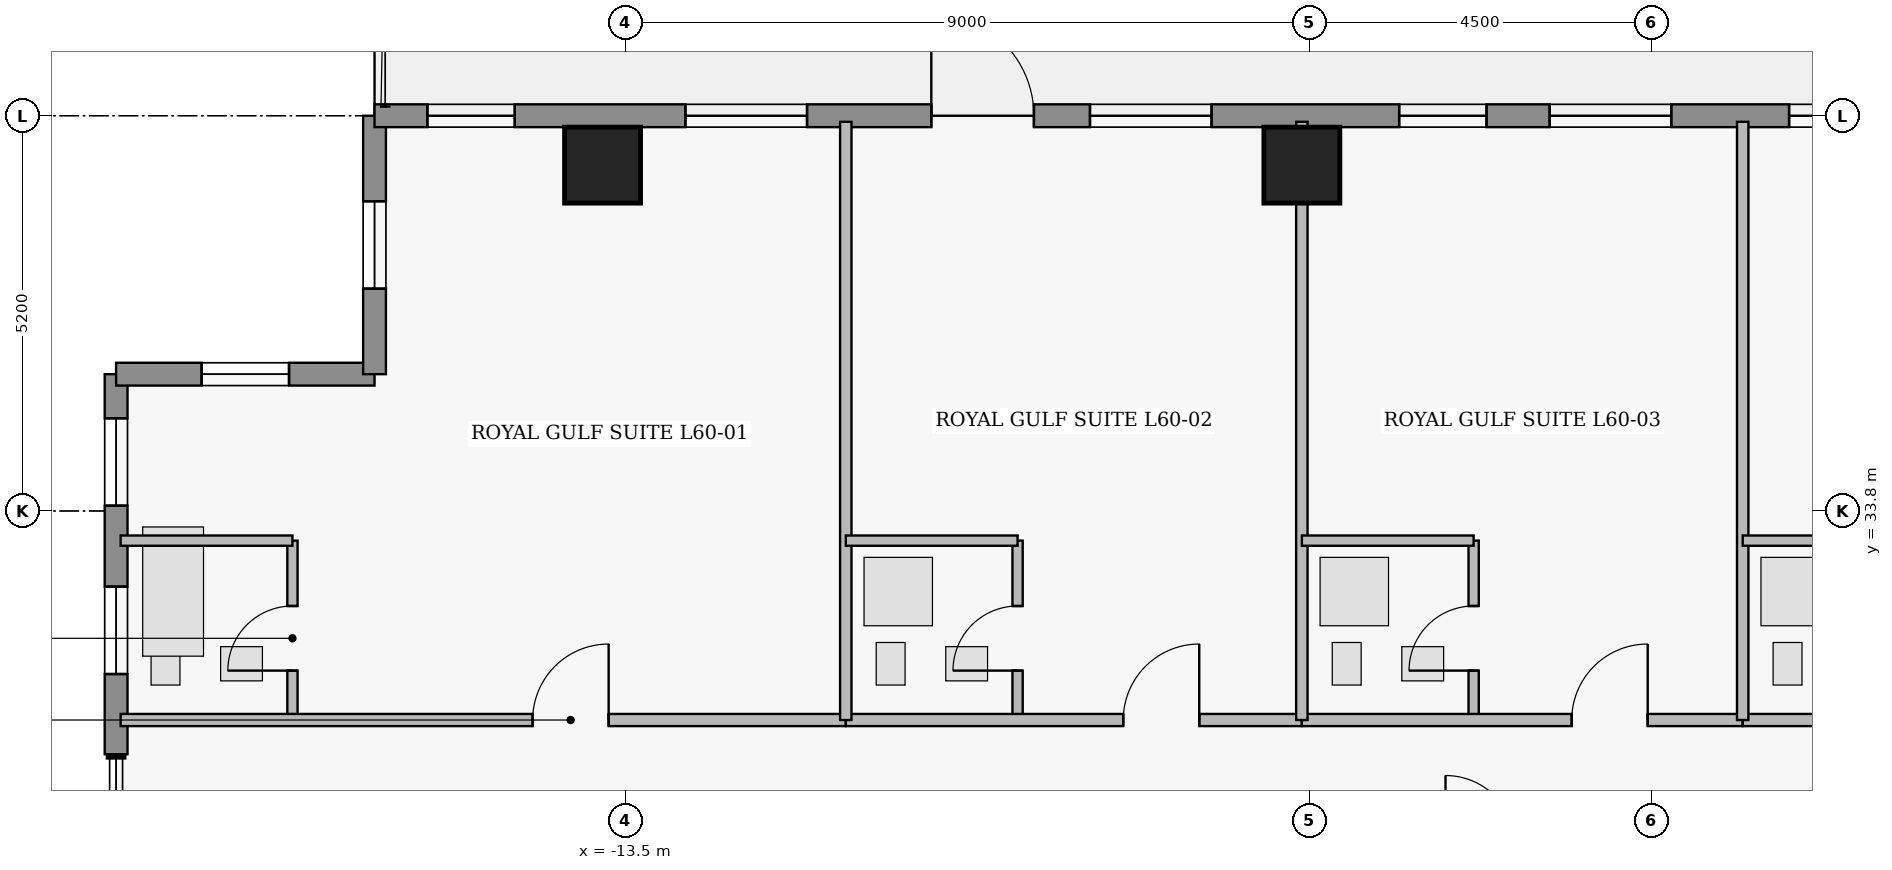
"""IFC4 building model, lengths in metres.
Left out: names, types, materials, properties, quantities, classifications, styles, units other than length and angle.
Written with IfcOpenShell. Run it as: python <this file> out.ifc"""

import sys

from ifc_helpers import new_model, si_unit, direction, frame, frame_2d, origin, origin_2d, place, context, subcontext, project, spatial, rectangle, extrude, element, fill, save


model = new_model("IFC4")
c1 = context("Model", 3, precision=1e-05, world=origin(), true_north=direction((0.0, 1.0)))
c2 = subcontext(c1, "Body", "Model", "MODEL_VIEW")
j1 = project(units=[si_unit("LENGTHUNIT", "METRE"), si_unit("PLANEANGLEUNIT", "RADIAN")], contexts=[c1])
p1 = place(None, origin())
s1 = spatial("IfcSite", under=j1, at=p1, CompositionType="ELEMENT")
p2 = place(p1, origin())
s2 = spatial("IfcBuilding", under=s1, at=p2, CompositionType="ELEMENT")
p3 = place(p2, frame((0.0, 0.0, 239.65)))
s3 = spatial("IfcBuildingStorey", under=s2, at=p3, CompositionType="ELEMENT", Elevation=239.65)
for number, where, z_axis, x_axis in (
    (1, (-13.8, 38.35, 0.43), (0.0, 0.0, 1.0), (1.0, 0.0, 0.0)),
    (2, (-4.6, 38.35, 0.43), (0.0, 0.0, 1.0), (1.0, 0.0, 0.0)),
):
    element("IfcColumn", number, at=place(p3, frame(where, z_axis=z_axis, x_axis=x_axis)), inside=s3, PredefinedType="COLUMN", context=c2, shape_type="SweptSolid", body=[
        extrude(rectangle(XDim=1.0, YDim=1.0, at=origin_2d()), origin(), (0.0, 0.0, 1.0), 3.27),
    ])
p4 = place(p3, frame((-20.2, 30.6, 0.0), z_axis=(0.0, 0.0, 1.0), x_axis=(0.0, 1.0, 0.0)))
e3 = element("IfcWall", 3, at=p4, inside=s3, PredefinedType="STANDARD", context=c2, shape_type="SweptSolid", body=[
    extrude(rectangle(XDim=5.0, YDim=0.3, at=frame_2d((2.5, 0.0))), origin(), (0.0, 0.0, 1.0), 3.48),
])
p5 = place(p4, frame((1.055, 0.0, 0.95)))
e4 = element("IfcOpeningElement", 4, at=p5, cuts=e3, PredefinedType="OPENING", context=c2, shape_type="SweptSolid", body=[
    extrude(rectangle(XDim=1.15, YDim=1.55, at=frame_2d((0.575, 0.775))), frame((0.0, 0.16, 0.0), z_axis=(0.0, -1.0, 0.0), x_axis=(1.0, 0.0, 0.0)), (0.0, 0.0, 1.0), 0.32),
])
p6 = place(p4, frame((3.27, 0.0, 0.95)))
e5 = element("IfcOpeningElement", 5, at=p6, cuts=e3, PredefinedType="OPENING", context=c2, shape_type="SweptSolid", body=[
    extrude(rectangle(XDim=1.15, YDim=1.55, at=frame_2d((0.575, 0.775))), frame((0.0, 0.16, 0.0), z_axis=(0.0, -1.0, 0.0), x_axis=(1.0, 0.0, 0.0)), (0.0, 0.0, 1.0), 0.32),
])
p7 = place(p3, frame((-20.2, 35.6, 0.0), z_axis=(0.0, 0.0, 1.0), x_axis=(1.0, 0.0, 0.0)))
e6 = element("IfcWall", 6, at=p7, inside=s3, PredefinedType="STANDARD", context=c2, shape_type="SweptSolid", body=[
    extrude(rectangle(XDim=3.4, YDim=0.3, at=frame_2d((1.7, 0.0))), origin(), (0.0, 0.0, 1.0), 3.48),
])
p8 = place(p7, frame((1.125, 0.0, 1.25)))
e7 = element("IfcOpeningElement", 7, at=p8, cuts=e6, PredefinedType="OPENING", context=c2, shape_type="SweptSolid", body=[
    extrude(rectangle(XDim=1.15, YDim=1.55, at=frame_2d((0.575, 0.775))), frame((0.0, 0.16, 0.0), z_axis=(0.0, -1.0, 0.0), x_axis=(1.0, 0.0, 0.0)), (0.0, 0.0, 1.0), 0.32),
])
p9 = place(p3, frame((-16.8, 35.6, 0.0), z_axis=(0.0, 0.0, 1.0), x_axis=(0.0, 1.0, 0.0)))
e8 = element("IfcWall", 8, at=p9, inside=s3, PredefinedType="STANDARD", context=c2, shape_type="SweptSolid", body=[
    extrude(rectangle(XDim=3.4, YDim=0.3, at=frame_2d((1.7, 0.0))), origin(), (0.0, 0.0, 1.0), 3.48),
])
p10 = place(p9, frame((1.125, 0.0, 1.25)))
e9 = element("IfcOpeningElement", 9, at=p10, cuts=e8, PredefinedType="OPENING", context=c2, shape_type="SweptSolid", body=[
    extrude(rectangle(XDim=1.15, YDim=1.55, at=frame_2d((0.575, 0.775))), frame((0.0, 0.16, 0.0), z_axis=(0.0, -1.0, 0.0), x_axis=(1.0, 0.0, 0.0)), (0.0, 0.0, 1.0), 0.32),
])
p11 = place(p3, frame((-16.8, 39.0, 0.0), z_axis=(0.0, 0.0, 1.0), x_axis=(1.0, 0.0, 0.0)))
e10 = element("IfcWall", 10, at=p11, inside=s3, PredefinedType="STANDARD", context=c2, shape_type="SweptSolid", body=[
    extrude(rectangle(XDim=25.05, YDim=0.3, at=frame_2d((12.525, 0.0))), origin(), (0.0, 0.0, 1.0), 3.48),
])
p12 = place(p11, frame((7.325, 0.0, 0.0)))
e11 = element("IfcOpeningElement", 11, at=p12, cuts=e10, PredefinedType="OPENING", context=c2, shape_type="SweptSolid", body=[
    extrude(rectangle(XDim=1.35, YDim=2.3, at=frame_2d((0.675, 1.15))), frame((0.0, 0.16, 0.0), z_axis=(0.0, -1.0, 0.0), x_axis=(1.0, 0.0, 0.0)), (0.0, 0.0, 1.0), 0.32),
])
p13 = place(p11, frame((15.46, 0.0, 0.85)))
e12 = element("IfcOpeningElement", 12, at=p13, cuts=e10, PredefinedType="OPENING", context=c2, shape_type="SweptSolid", body=[
    extrude(rectangle(XDim=1.6, YDim=1.8, at=frame_2d((0.8, 0.9))), frame((0.0, 0.16, 0.0), z_axis=(0.0, -1.0, 0.0), x_axis=(1.0, 0.0, 0.0)), (0.0, 0.0, 1.0), 0.32),
])
p14 = place(p11, frame((0.695, 0.0, 0.95)))
e13 = element("IfcOpeningElement", 13, at=p14, cuts=e10, PredefinedType="OPENING", context=c2, shape_type="SweptSolid", body=[
    extrude(rectangle(XDim=1.15, YDim=1.55, at=frame_2d((0.575, 0.775))), frame((0.0, 0.16, 0.0), z_axis=(0.0, -1.0, 0.0), x_axis=(1.0, 0.0, 0.0)), (0.0, 0.0, 1.0), 0.32),
])
p15 = place(p11, frame((4.09, 0.0, 0.85)))
e14 = element("IfcOpeningElement", 14, at=p15, cuts=e10, PredefinedType="OPENING", context=c2, shape_type="SweptSolid", body=[
    extrude(rectangle(XDim=1.6, YDim=1.8, at=frame_2d((0.8, 0.9))), frame((0.0, 0.16, 0.0), z_axis=(0.0, -1.0, 0.0), x_axis=(1.0, 0.0, 0.0)), (0.0, 0.0, 1.0), 0.32),
])
p16 = place(p11, frame((9.413, 0.0, 0.85)))
e15 = element("IfcOpeningElement", 15, at=p16, cuts=e10, PredefinedType="OPENING", context=c2, shape_type="SweptSolid", body=[
    extrude(rectangle(XDim=1.6, YDim=1.8, at=frame_2d((0.8, 0.9))), frame((0.0, 0.16, 0.0), z_axis=(0.0, -1.0, 0.0), x_axis=(1.0, 0.0, 0.0)), (0.0, 0.0, 1.0), 0.32),
])
p17 = place(p11, frame((13.48, 0.0, 0.95)))
e16 = element("IfcOpeningElement", 16, at=p17, cuts=e10, PredefinedType="OPENING", context=c2, shape_type="SweptSolid", body=[
    extrude(rectangle(XDim=1.15, YDim=1.55, at=frame_2d((0.575, 0.775))), frame((0.0, 0.16, 0.0), z_axis=(0.0, -1.0, 0.0), x_axis=(1.0, 0.0, 0.0)), (0.0, 0.0, 1.0), 0.32),
])
p18 = place(p11, frame((18.61, 0.0, 0.85)))
e17 = element("IfcOpeningElement", 17, at=p18, cuts=e10, PredefinedType="OPENING", context=c2, shape_type="SweptSolid", body=[
    extrude(rectangle(XDim=1.6, YDim=1.8, at=frame_2d((0.8, 0.9))), frame((0.0, 0.16, 0.0), z_axis=(0.0, -1.0, 0.0), x_axis=(1.0, 0.0, 0.0)), (0.0, 0.0, 1.0), 0.32),
])
p19 = place(p11, frame((22.49, 0.0, 0.85)))
e18 = element("IfcOpeningElement", 18, at=p19, cuts=e10, PredefinedType="OPENING", context=c2, shape_type="SweptSolid", body=[
    extrude(rectangle(XDim=1.6, YDim=1.8, at=frame_2d((0.8, 0.9))), frame((0.0, 0.16, 0.0), z_axis=(0.0, -1.0, 0.0), x_axis=(1.0, 0.0, 0.0)), (0.0, 0.0, 1.0), 0.32),
])
p20 = place(p3, frame((-17.88, 31.05, 0.0), z_axis=(0.0, 0.0, 1.0), x_axis=(0.0, 1.0, 0.0)))
e19 = element("IfcWall", 19, at=p20, inside=s3, PredefinedType="PLUMBINGWALL", context=c2, shape_type="SweptSolid", body=[
    extrude(rectangle(XDim=2.36, YDim=0.135, at=frame_2d((1.18, 0.0))), origin(), (0.0, 0.0, 1.0), 3.48),
])
p21 = place(p20, frame((0.65, 0.0, 0.0)))
e20 = element("IfcOpeningElement", 20, at=p21, cuts=e19, PredefinedType="OPENING", context=c2, shape_type="SweptSolid", body=[
    extrude(rectangle(XDim=0.85, YDim=2.1, at=frame_2d((0.425, 1.05))), frame((0.0, 0.077, 0.0), z_axis=(0.0, -1.0, 0.0), x_axis=(1.0, 0.0, 0.0)), (0.0, 0.0, 1.0), 0.155),
])
p22 = place(p3, frame((-20.14, 31.05, 0.0), z_axis=(0.0, 0.0, 1.0), x_axis=(1.0, 0.0, 0.0)))
e21 = element("IfcWall", 21, at=p22, inside=s3, PredefinedType="PARTITIONING", context=c2, shape_type="SweptSolid", body=[
    extrude(rectangle(XDim=9.54, YDim=0.16, at=frame_2d((4.77, 0.0))), origin(), (0.0, 0.0, 1.0), 3.48),
])
p23 = place(p22, frame((5.42, 0.0, 0.0)))
e22 = element("IfcOpeningElement", 22, at=p23, cuts=e21, PredefinedType="OPENING", context=c2, shape_type="SweptSolid", body=[
    extrude(rectangle(XDim=1.0, YDim=2.15, at=frame_2d((0.5, 1.075))), frame((0.0, 0.09, 0.0), z_axis=(0.0, -1.0, 0.0), x_axis=(1.0, 0.0, 0.0)), (0.0, 0.0, 1.0), 0.18),
])
p24 = place(p3, frame((-8.34, 31.05, 0.0), z_axis=(0.0, 0.0, 1.0), x_axis=(0.0, 1.0, 0.0)))
e23 = element("IfcWall", 23, at=p24, inside=s3, PredefinedType="PLUMBINGWALL", context=c2, shape_type="SweptSolid", body=[
    extrude(rectangle(XDim=2.36, YDim=0.135, at=frame_2d((1.18, 0.0))), origin(), (0.0, 0.0, 1.0), 3.48),
])
p25 = place(p24, frame((0.65, 0.0, 0.0)))
e24 = element("IfcOpeningElement", 24, at=p25, cuts=e23, PredefinedType="OPENING", context=c2, shape_type="SweptSolid", body=[
    extrude(rectangle(XDim=0.85, YDim=2.1, at=frame_2d((0.425, 1.05))), frame((0.0, 0.077, 0.0), z_axis=(0.0, -1.0, 0.0), x_axis=(1.0, 0.0, 0.0)), (0.0, 0.0, 1.0), 0.155),
])
p26 = place(p3, frame((-10.6, 31.05, 0.0), z_axis=(0.0, 0.0, 1.0), x_axis=(1.0, 0.0, 0.0)))
e25 = element("IfcWall", 25, at=p26, inside=s3, PredefinedType="PARTITIONING", context=c2, shape_type="SweptSolid", body=[
    extrude(rectangle(XDim=6.0, YDim=0.16, at=frame_2d((3.0, 0.0))), origin(), (0.0, 0.0, 1.0), 3.48),
])
p27 = place(p26, frame((3.65, 0.0, 0.0)))
e26 = element("IfcOpeningElement", 26, at=p27, cuts=e25, PredefinedType="OPENING", context=c2, shape_type="SweptSolid", body=[
    extrude(rectangle(XDim=1.0, YDim=2.15, at=frame_2d((0.5, 1.075))), frame((0.0, 0.09, 0.0), z_axis=(0.0, -1.0, 0.0), x_axis=(1.0, 0.0, 0.0)), (0.0, 0.0, 1.0), 0.18),
])
p28 = place(p3, frame((-2.34, 31.05, 0.0), z_axis=(0.0, 0.0, 1.0), x_axis=(0.0, 1.0, 0.0)))
e27 = element("IfcWall", 27, at=p28, inside=s3, PredefinedType="PLUMBINGWALL", context=c2, shape_type="SweptSolid", body=[
    extrude(rectangle(XDim=2.36, YDim=0.135, at=frame_2d((1.18, 0.0))), origin(), (0.0, 0.0, 1.0), 3.48),
])
p29 = place(p28, frame((0.65, 0.0, 0.0)))
e28 = element("IfcOpeningElement", 28, at=p29, cuts=e27, PredefinedType="OPENING", context=c2, shape_type="SweptSolid", body=[
    extrude(rectangle(XDim=0.85, YDim=2.1, at=frame_2d((0.425, 1.05))), frame((0.0, 0.077, 0.0), z_axis=(0.0, -1.0, 0.0), x_axis=(1.0, 0.0, 0.0)), (0.0, 0.0, 1.0), 0.155),
])
p30 = place(p3, frame((-4.6, 31.05, 0.0), z_axis=(0.0, 0.0, 1.0), x_axis=(1.0, 0.0, 0.0)))
e29 = element("IfcWall", 29, at=p30, inside=s3, PredefinedType="PARTITIONING", context=c2, shape_type="SweptSolid", body=[
    extrude(rectangle(XDim=5.8, YDim=0.16, at=frame_2d((2.9, 0.0))), origin(), (0.0, 0.0, 1.0), 3.48),
])
p31 = place(p30, frame((3.55, 0.0, 0.0)))
e30 = element("IfcOpeningElement", 30, at=p31, cuts=e29, PredefinedType="OPENING", context=c2, shape_type="SweptSolid", body=[
    extrude(rectangle(XDim=1.0, YDim=2.15, at=frame_2d((0.5, 1.075))), frame((0.0, 0.09, 0.0), z_axis=(0.0, -1.0, 0.0), x_axis=(1.0, 0.0, 0.0)), (0.0, 0.0, 1.0), 0.18),
])
p32 = place(p3, frame((1.2, 31.05, 0.0), z_axis=(0.0, 0.0, 1.0), x_axis=(1.0, 0.0, 0.0)))
e31 = element("IfcWall", 31, at=p32, inside=s3, PredefinedType="PARTITIONING", context=c2, shape_type="SweptSolid", body=[
    extrude(rectangle(XDim=6.6, YDim=0.16, at=frame_2d((3.3, 0.0))), origin(), (0.0, 0.0, 1.0), 3.48),
])
p33 = place(p32, frame((3.95, 0.0, 0.0)))
e32 = element("IfcOpeningElement", 32, at=p33, cuts=e31, PredefinedType="OPENING", context=c2, shape_type="SweptSolid", body=[
    extrude(rectangle(XDim=1.0, YDim=2.15, at=frame_2d((0.5, 1.075))), frame((0.0, 0.09, 0.0), z_axis=(0.0, -1.0, 0.0), x_axis=(1.0, 0.0, 0.0)), (0.0, 0.0, 1.0), 0.18),
])
p34 = place(p3, frame((-20.14, 33.41, 0.0), z_axis=(0.0, 0.0, 1.0), x_axis=(1.0, 0.0, 0.0)))
e33 = element("IfcWall", 33, at=p34, inside=s3, PredefinedType="PLUMBINGWALL", context=c2, shape_type="SweptSolid", body=[
    extrude(rectangle(XDim=2.26, YDim=0.135, at=frame_2d((1.13, 0.0))), origin(), (0.0, 0.0, 1.0), 3.48),
])
p35 = place(p3, frame((-10.6, 31.05, 0.0), z_axis=(0.0, 0.0, 1.0), x_axis=(0.0, 1.0, 0.0)))
e34 = element("IfcWall", 34, at=p35, inside=s3, PredefinedType="PARTITIONING", context=c2, shape_type="SweptSolid", body=[
    extrude(rectangle(XDim=7.87, YDim=0.15, at=frame_2d((3.935, 0.0))), origin(), (0.0, 0.0, 1.0), 3.48),
])
p36 = place(p3, frame((-10.6, 33.41, 0.0), z_axis=(0.0, 0.0, 1.0), x_axis=(1.0, 0.0, 0.0)))
e35 = element("IfcWall", 35, at=p36, inside=s3, PredefinedType="PLUMBINGWALL", context=c2, shape_type="SweptSolid", body=[
    extrude(rectangle(XDim=2.26, YDim=0.135, at=frame_2d((1.13, 0.0))), origin(), (0.0, 0.0, 1.0), 3.076),
])
p37 = place(p3, frame((-4.6, 31.05, 0.0), z_axis=(0.0, 0.0, 1.0), x_axis=(0.0, 1.0, 0.0)))
e36 = element("IfcWall", 36, at=p37, inside=s3, PredefinedType="PARTITIONING", context=c2, shape_type="SweptSolid", body=[
    extrude(rectangle(XDim=7.87, YDim=0.15, at=frame_2d((3.935, 0.0))), origin(), (0.0, 0.0, 1.0), 2.362),
])
p38 = place(p3, frame((-4.6, 33.41, 0.0), z_axis=(0.0, 0.0, 1.0), x_axis=(1.0, 0.0, 0.0)))
e37 = element("IfcWall", 37, at=p38, inside=s3, PredefinedType="PLUMBINGWALL", context=c2, shape_type="SweptSolid", body=[
    extrude(rectangle(XDim=2.26, YDim=0.135, at=frame_2d((1.13, 0.0))), origin(), (0.0, 0.0, 1.0), 3.076),
])
p39 = place(p3, frame((1.2, 31.05, 0.0), z_axis=(0.0, 0.0, 1.0), x_axis=(0.0, 1.0, 0.0)))
e38 = element("IfcWall", 38, at=p39, inside=s3, PredefinedType="PARTITIONING", context=c2, shape_type="SweptSolid", body=[
    extrude(rectangle(XDim=7.87, YDim=0.15, at=frame_2d((3.935, 0.0))), origin(), (0.0, 0.0, 1.0), 3.48),
])
p40 = place(p3, frame((1.2, 33.41, 0.0), z_axis=(0.0, 0.0, 1.0), x_axis=(1.0, 0.0, 0.0)))
e39 = element("IfcWall", 39, at=p40, inside=s3, PredefinedType="PLUMBINGWALL", context=c2, shape_type="SweptSolid", body=[
    extrude(rectangle(XDim=2.26, YDim=0.135, at=frame_2d((1.13, 0.0))), origin(), (0.0, 0.0, 1.0), 3.076),
])
p41 = place(p5, origin())
e40 = element("IfcWindow", 40, at=p41, inside=s3, PartitioningType="SINGLE_PANEL", PredefinedType="WINDOW", context=c2, shape_type="SweptSolid", body=[
    extrude(rectangle(XDim=1.15, YDim=1.55, at=frame_2d((0.575, 0.775))), frame((0.0, 0.03, 0.0), z_axis=(0.0, -1.0, 0.0), x_axis=(1.0, 0.0, 0.0)), (0.0, 0.0, 1.0), 0.06),
])
fill(e4, e40)
p42 = place(p6, origin())
e41 = element("IfcWindow", 41, at=p42, inside=s3, PartitioningType="SINGLE_PANEL", PredefinedType="WINDOW", context=c2, shape_type="SweptSolid", body=[
    extrude(rectangle(XDim=1.15, YDim=1.55, at=frame_2d((0.575, 0.775))), frame((0.0, 0.03, 0.0), z_axis=(0.0, -1.0, 0.0), x_axis=(1.0, 0.0, 0.0)), (0.0, 0.0, 1.0), 0.06),
])
fill(e5, e41)
p43 = place(p8, origin())
e42 = element("IfcWindow", 42, at=p43, inside=s3, PartitioningType="SINGLE_PANEL", PredefinedType="WINDOW", context=c2, shape_type="SweptSolid", body=[
    extrude(rectangle(XDim=1.15, YDim=1.55, at=frame_2d((0.575, 0.775))), frame((0.0, 0.03, 0.0), z_axis=(0.0, -1.0, 0.0), x_axis=(1.0, 0.0, 0.0)), (0.0, 0.0, 1.0), 0.06),
])
fill(e7, e42)
p44 = place(p10, origin())
e43 = element("IfcWindow", 43, at=p44, inside=s3, PartitioningType="SINGLE_PANEL", PredefinedType="WINDOW", context=c2, shape_type="SweptSolid", body=[
    extrude(rectangle(XDim=1.15, YDim=1.55, at=frame_2d((0.575, 0.775))), frame((0.0, 0.03, 0.0), z_axis=(0.0, -1.0, 0.0), x_axis=(1.0, 0.0, 0.0)), (0.0, 0.0, 1.0), 0.06),
])
fill(e9, e43)
p45 = place(p12, origin())
e44 = element("IfcDoor", 44, at=p45, inside=s3, OperationType="SINGLE_SWING_LEFT", PredefinedType="DOOR", context=c2, shape_type="SweptSolid", body=[
    extrude(rectangle(XDim=1.35, YDim=2.3, at=frame_2d((0.675, 1.15))), frame((0.0, 0.025, 0.0), z_axis=(0.0, -1.0, 0.0), x_axis=(1.0, 0.0, 0.0)), (0.0, 0.0, 1.0), 0.05),
])
fill(e11, e44)
p46 = place(p13, origin())
e45 = element("IfcWindow", 45, at=p46, inside=s3, PartitioningType="SINGLE_PANEL", PredefinedType="WINDOW", context=c2, shape_type="SweptSolid", body=[
    extrude(rectangle(XDim=1.6, YDim=1.8, at=frame_2d((0.8, 0.9))), frame((0.0, 0.03, 0.0), z_axis=(0.0, -1.0, 0.0), x_axis=(1.0, 0.0, 0.0)), (0.0, 0.0, 1.0), 0.06),
])
fill(e12, e45)
p47 = place(p14, origin())
e46 = element("IfcWindow", 46, at=p47, inside=s3, PartitioningType="SINGLE_PANEL", PredefinedType="WINDOW", context=c2, shape_type="SweptSolid", body=[
    extrude(rectangle(XDim=1.15, YDim=1.55, at=frame_2d((0.575, 0.775))), frame((0.0, 0.03, 0.0), z_axis=(0.0, -1.0, 0.0), x_axis=(1.0, 0.0, 0.0)), (0.0, 0.0, 1.0), 0.06),
])
fill(e13, e46)
p48 = place(p15, origin())
e47 = element("IfcWindow", 47, at=p48, inside=s3, PartitioningType="SINGLE_PANEL", PredefinedType="WINDOW", context=c2, shape_type="SweptSolid", body=[
    extrude(rectangle(XDim=1.6, YDim=1.8, at=frame_2d((0.8, 0.9))), frame((0.0, 0.03, 0.0), z_axis=(0.0, -1.0, 0.0), x_axis=(1.0, 0.0, 0.0)), (0.0, 0.0, 1.0), 0.06),
])
fill(e14, e47)
p49 = place(p16, origin())
e48 = element("IfcWindow", 48, at=p49, inside=s3, PartitioningType="SINGLE_PANEL", PredefinedType="WINDOW", context=c2, shape_type="SweptSolid", body=[
    extrude(rectangle(XDim=1.6, YDim=1.8, at=frame_2d((0.8, 0.9))), frame((0.0, 0.03, 0.0), z_axis=(0.0, -1.0, 0.0), x_axis=(1.0, 0.0, 0.0)), (0.0, 0.0, 1.0), 0.06),
])
fill(e15, e48)
p50 = place(p17, origin())
e49 = element("IfcWindow", 49, at=p50, inside=s3, PartitioningType="SINGLE_PANEL", PredefinedType="WINDOW", context=c2, shape_type="SweptSolid", body=[
    extrude(rectangle(XDim=1.15, YDim=1.55, at=frame_2d((0.575, 0.775))), frame((0.0, 0.03, 0.0), z_axis=(0.0, -1.0, 0.0), x_axis=(1.0, 0.0, 0.0)), (0.0, 0.0, 1.0), 0.06),
])
fill(e16, e49)
p51 = place(p18, origin())
e50 = element("IfcWindow", 50, at=p51, inside=s3, PartitioningType="SINGLE_PANEL", PredefinedType="WINDOW", context=c2, shape_type="SweptSolid", body=[
    extrude(rectangle(XDim=1.6, YDim=1.8, at=frame_2d((0.8, 0.9))), frame((0.0, 0.03, 0.0), z_axis=(0.0, -1.0, 0.0), x_axis=(1.0, 0.0, 0.0)), (0.0, 0.0, 1.0), 0.06),
])
fill(e17, e50)
p52 = place(p21, origin())
e51 = element("IfcDoor", 51, at=p52, inside=s3, OperationType="SINGLE_SWING_LEFT", PredefinedType="DOOR", context=c2, shape_type="SweptSolid", body=[
    extrude(rectangle(XDim=0.85, YDim=2.1, at=frame_2d((0.425, 1.05))), frame((0.0, 0.025, 0.0), z_axis=(0.0, -1.0, 0.0), x_axis=(1.0, 0.0, 0.0)), (0.0, 0.0, 1.0), 0.05),
])
fill(e20, e51)
p53 = place(p23, origin())
e52 = element("IfcDoor", 52, at=p53, inside=s3, OperationType="SINGLE_SWING_RIGHT", PredefinedType="DOOR", context=c2, shape_type="SweptSolid", body=[
    extrude(rectangle(XDim=1.0, YDim=2.15, at=frame_2d((0.5, 1.075))), frame((0.0, 0.025, 0.0), z_axis=(0.0, -1.0, 0.0), x_axis=(1.0, 0.0, 0.0)), (0.0, 0.0, 1.0), 0.05),
])
fill(e22, e52)
p54 = place(p25, origin())
e53 = element("IfcDoor", 53, at=p54, inside=s3, OperationType="SINGLE_SWING_LEFT", PredefinedType="DOOR", context=c2, shape_type="SweptSolid", body=[
    extrude(rectangle(XDim=0.85, YDim=2.1, at=frame_2d((0.425, 1.05))), frame((0.0, 0.025, 0.0), z_axis=(0.0, -1.0, 0.0), x_axis=(1.0, 0.0, 0.0)), (0.0, 0.0, 1.0), 0.05),
])
fill(e24, e53)
p55 = place(p27, origin())
e54 = element("IfcDoor", 54, at=p55, inside=s3, OperationType="SINGLE_SWING_RIGHT", PredefinedType="DOOR", context=c2, shape_type="SweptSolid", body=[
    extrude(rectangle(XDim=1.0, YDim=2.15, at=frame_2d((0.5, 1.075))), frame((0.0, 0.025, 0.0), z_axis=(0.0, -1.0, 0.0), x_axis=(1.0, 0.0, 0.0)), (0.0, 0.0, 1.0), 0.05),
])
fill(e26, e54)
p56 = place(p29, origin())
e55 = element("IfcDoor", 55, at=p56, inside=s3, OperationType="SINGLE_SWING_LEFT", PredefinedType="DOOR", context=c2, shape_type="SweptSolid", body=[
    extrude(rectangle(XDim=0.85, YDim=2.1, at=frame_2d((0.425, 1.05))), frame((0.0, 0.025, 0.0), z_axis=(0.0, -1.0, 0.0), x_axis=(1.0, 0.0, 0.0)), (0.0, 0.0, 1.0), 0.05),
])
fill(e28, e55)
p57 = place(p31, origin())
e56 = element("IfcDoor", 56, at=p57, inside=s3, OperationType="SINGLE_SWING_RIGHT", PredefinedType="DOOR", context=c2, shape_type="SweptSolid", body=[
    extrude(rectangle(XDim=1.0, YDim=2.15, at=frame_2d((0.5, 1.075))), frame((0.0, 0.025, 0.0), z_axis=(0.0, -1.0, 0.0), x_axis=(1.0, 0.0, 0.0)), (0.0, 0.0, 1.0), 0.05),
])
fill(e30, e56)
save(model, sys.argv[1])
